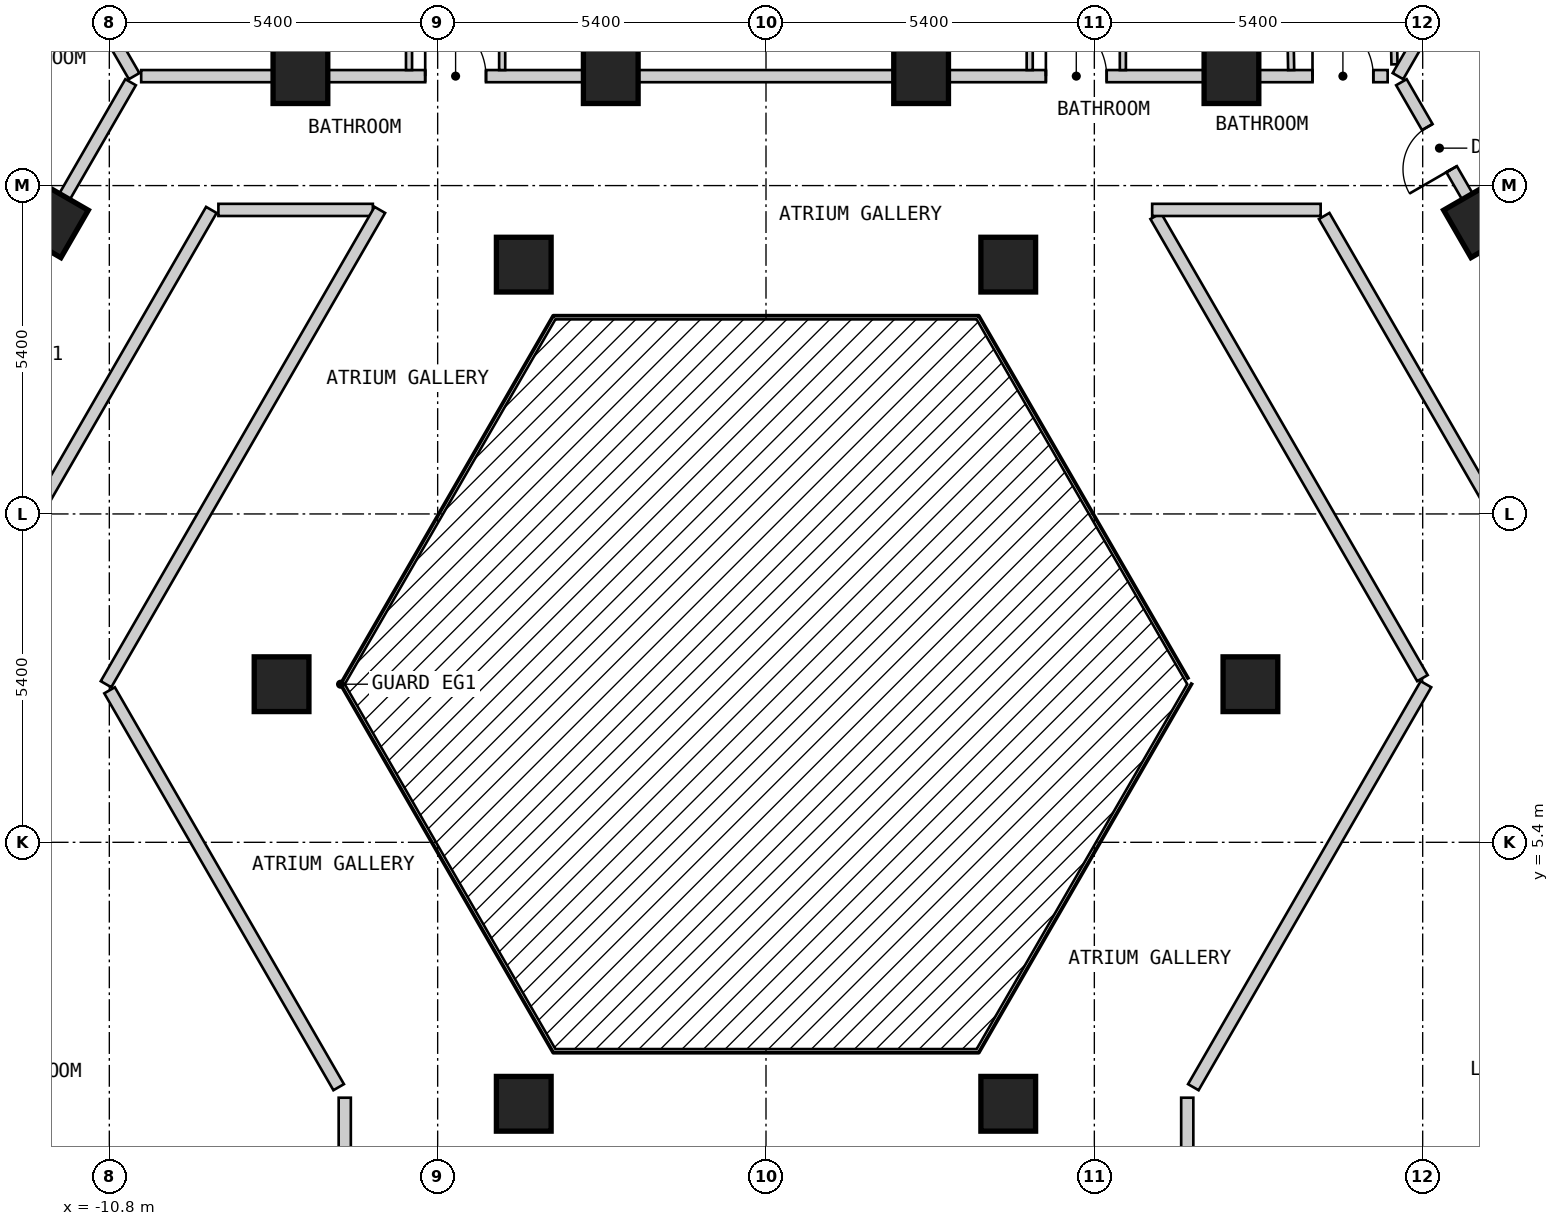
"""IFC4 building model, lengths in metres.
Left out: names, types, materials, properties, quantities, classifications, styles, units other than length and angle.
Written with IfcOpenShell. Run it as: python <this file> out.ifc"""

import sys

from ifc_helpers import new_model, si_unit, direction, frame, frame_2d, origin, origin_2d, place, context, subcontext, project, spatial, rectangle, extrude, element, fill, save


model = new_model("IFC4")
c1 = context("Model", 3, precision=1e-05, world=origin(), true_north=direction((0.0, 1.0)))
c2 = subcontext(c1, "Body", "Model", "MODEL_VIEW")
j1 = project(units=[si_unit("LENGTHUNIT", "METRE"), si_unit("PLANEANGLEUNIT", "RADIAN")], contexts=[c1])
p1 = place(None, origin())
s1 = spatial("IfcSite", under=j1, at=p1, CompositionType="ELEMENT")
p2 = place(p1, origin())
s2 = spatial("IfcBuilding", under=s1, at=p2, CompositionType="ELEMENT")
p3 = place(p2, frame((0.0, 0.0, 59.4)))
s3 = spatial("IfcBuildingStorey", under=s2, at=p3, CompositionType="ELEMENT", Elevation=59.4)
for number, where, z_axis, x_axis in (
    (1, (3.984, 1.1, 0.0), (0.0, 0.0, 1.0), (1.0, 0.0, 0.0)),
    (2, (7.967, 8.0, 0.0), (0.0, 0.0, 1.0), (1.0, 0.0, 0.0)),
    (3, (11.76, 15.631, 0.0), (0.0, 0.0, 1.0), (-0.5, 0.866, 0.0)),
    (4, (7.655, 18.0, 0.0), (0.0, 0.0, 1.0), (-1.0, 0.0, 0.0)),
    (5, (3.984, 14.9, 0.0), (0.0, 0.0, 1.0), (1.0, 0.0, 0.0)),
    (6, (2.551, 18.0, 0.0), (0.0, 0.0, 1.0), (-1.0, 0.0, 0.0)),
    (7, (-2.553, 18.0, 0.0), (0.0, 0.0, 1.0), (-1.0, 0.0, 0.0)),
    (8, (-3.984, 14.9, 0.0), (0.0, 0.0, 1.0), (1.0, 0.0, 0.0)),
    (9, (-7.657, 18.0, 0.0), (0.0, 0.0, 1.0), (-1.0, 0.0, 0.0)),
    (10, (-11.761, 15.63, 0.0), (0.0, 0.0, 1.0), (-0.5, -0.866, 0.0)),
    (11, (-7.967, 8.0, 0.0), (0.0, 0.0, 1.0), (1.0, 0.0, 0.0)),
    (12, (-3.984, 1.1, 0.0), (0.0, 0.0, 1.0), (1.0, 0.0, 0.0)),
):
    element("IfcColumn", number, at=place(p3, frame(where, z_axis=z_axis, x_axis=x_axis)), inside=s3, PredefinedType="COLUMN", context=c2, shape_type="SweptSolid", body=[
        extrude(rectangle(XDim=0.9, YDim=0.9, at=origin_2d()), origin(), (0.0, 0.0, 1.0), 3.0),
    ])
p4 = place(p3, frame((-10.796, 7.9, 0.0), z_axis=(0.0, 0.0, 1.0), x_axis=(0.499954271211, -0.866051803703, 0.0)))
e13 = element("IfcWall", 13, at=p4, inside=s3, PredefinedType="PARTITIONING", context=c2, shape_type="SweptSolid", body=[
    extrude(rectangle(XDim=7.536, YDim=0.2, at=frame_2d((3.768, 0.0))), origin(), (0.0, 0.0, 1.0), 2.6),
])
p5 = place(p3, frame((6.409, 15.7, 0.0), z_axis=(0.0, 0.0, 1.0), x_axis=(0.499930377127, -0.866065596838, 0.0)))
e14 = element("IfcWall", 14, at=p5, inside=s3, PredefinedType="PARTITIONING", context=c2, shape_type="SweptSolid", body=[
    extrude(rectangle(XDim=8.775, YDim=0.2, at=frame_2d((4.388, 0.0))), origin(), (0.0, 0.0, 1.0), 2.6),
])
p6 = place(p3, frame((9.18, 15.7, 0.0), z_axis=(0.0, 0.0, 1.0), x_axis=(0.500003652032, -0.866023295272, 0.0)))
e15 = element("IfcWall", 15, at=p6, inside=s3, PredefinedType="PARTITIONING", context=c2, shape_type="SweptSolid", body=[
    extrude(rectangle(XDim=18.012, YDim=0.2, at=frame_2d((9.006, 0.0))), origin(), (0.0, 0.0, 1.0), 2.6),
])
p7 = place(p6, frame((8.556, 0.0, 0.0)))
e16 = element("IfcOpeningElement", 16, at=p7, cuts=e15, PredefinedType="OPENING", context=c2, shape_type="SweptSolid", body=[
    extrude(rectangle(XDim=0.9, YDim=2.1, at=frame_2d((0.45, 1.05))), frame((0.0, 0.11, 0.0), z_axis=(0.0, -1.0, 0.0), x_axis=(1.0, 0.0, 0.0)), (0.0, 0.0, 1.0), 0.22),
])
p8 = place(p3, frame((10.45, 17.9, 0.0), z_axis=(0.0, 0.0, 1.0), x_axis=(0.500034352617, -0.866005569383, 0.0)))
e17 = element("IfcWall", 17, at=p8, inside=s3, PredefinedType="PARTITIONING", context=c2, shape_type="SweptSolid", body=[
    extrude(rectangle(XDim=20.553, YDim=0.2, at=frame_2d((10.276, 0.0))), origin(), (0.0, 0.0, 1.0), 2.6),
])
p9 = place(p8, frame((14.903, 0.0, 0.0)))
e18 = element("IfcOpeningElement", 18, at=p9, cuts=e17, PredefinedType="OPENING", context=c2, shape_type="SweptSolid", body=[
    extrude(rectangle(XDim=1.0, YDim=2.1, at=frame_2d((0.5, 1.05))), frame((0.0, 0.11, 0.0), z_axis=(0.0, -1.0, 0.0), x_axis=(1.0, 0.0, 0.0)), (0.0, 0.0, 1.0), 0.22),
])
p10 = place(p8, frame((9.775, 0.0, 0.0)))
e19 = element("IfcOpeningElement", 19, at=p10, cuts=e17, PredefinedType="OPENING", context=c2, shape_type="SweptSolid", body=[
    extrude(rectangle(XDim=1.0, YDim=2.1, at=frame_2d((0.5, 1.05))), frame((0.0, 0.11, 0.0), z_axis=(0.0, -1.0, 0.0), x_axis=(1.0, 0.0, 0.0)), (0.0, 0.0, 1.0), 0.22),
])
p11 = place(p8, frame((0.852, 0.0, 0.0)))
e20 = element("IfcOpeningElement", 20, at=p11, cuts=e17, PredefinedType="OPENING", context=c2, shape_type="SweptSolid", body=[
    extrude(rectangle(XDim=0.8, YDim=2.1, at=frame_2d((0.4, 1.05))), frame((0.0, 0.11, 0.0), z_axis=(0.0, -1.0, 0.0), x_axis=(1.0, 0.0, 0.0)), (0.0, 0.0, 1.0), 0.22),
])
p12 = place(p3, frame((-9.006, 15.8, 0.0), z_axis=(0.0, 0.0, 1.0), x_axis=(1.0, 0.0, 0.0)))
e21 = element("IfcWall", 21, at=p12, inside=s3, PredefinedType="PARTITIONING", context=c2, shape_type="SweptSolid", body=[
    extrude(rectangle(XDim=2.54, YDim=0.2, at=frame_2d((1.27, 0.0))), origin(), (0.0, 0.0, 1.0), 2.6),
])
p13 = place(p3, frame((6.351, 15.8, 0.0), z_axis=(0.0, 0.0, 1.0), x_axis=(1.0, 0.0, 0.0)))
e22 = element("IfcWall", 22, at=p13, inside=s3, PredefinedType="PARTITIONING", context=c2, shape_type="SweptSolid", body=[
    extrude(rectangle(XDim=2.771, YDim=0.2, at=frame_2d((1.385, 0.0))), origin(), (0.0, 0.0, 1.0), 2.6),
])
p14 = place(p3, frame((-10.276, 18.0, 0.0), z_axis=(0.0, 0.0, 1.0), x_axis=(1.0, 0.0, 0.0)))
e23 = element("IfcWall", 23, at=p14, inside=s3, PredefinedType="PARTITIONING", context=c2, shape_type="SweptSolid", body=[
    extrude(rectangle(XDim=20.5, YDim=0.2, at=frame_2d((10.25, 0.0))), origin(), (0.0, 0.0, 1.0), 2.6),
])
p15 = place(p14, frame((19.264, 0.0, 0.0)))
e24 = element("IfcOpeningElement", 24, at=p15, cuts=e23, PredefinedType="OPENING", context=c2, shape_type="SweptSolid", body=[
    extrude(rectangle(XDim=1.0, YDim=2.1, at=frame_2d((0.5, 1.05))), frame((0.0, 0.11, 0.0), z_axis=(0.0, -1.0, 0.0), x_axis=(1.0, 0.0, 0.0)), (0.0, 0.0, 1.0), 0.22),
])
p16 = place(p14, frame((14.879, 0.0, 0.0)))
e25 = element("IfcOpeningElement", 25, at=p16, cuts=e23, PredefinedType="OPENING", context=c2, shape_type="SweptSolid", body=[
    extrude(rectangle(XDim=1.0, YDim=2.1, at=frame_2d((0.5, 1.05))), frame((0.0, 0.11, 0.0), z_axis=(0.0, -1.0, 0.0), x_axis=(1.0, 0.0, 0.0)), (0.0, 0.0, 1.0), 0.22),
])
p17 = place(p14, frame((4.671, 0.0, 0.0)))
e26 = element("IfcOpeningElement", 26, at=p17, cuts=e23, PredefinedType="OPENING", context=c2, shape_type="SweptSolid", body=[
    extrude(rectangle(XDim=1.0, YDim=2.1, at=frame_2d((0.5, 1.05))), frame((0.0, 0.11, 0.0), z_axis=(0.0, -1.0, 0.0), x_axis=(1.0, 0.0, 0.0)), (0.0, 0.0, 1.0), 0.22),
])
p18 = place(p3, frame((7.028, 1.373, 0.0), z_axis=(0.0, 0.0, 1.0), x_axis=(0.49998574534, 0.86603363356, 0.0)))
e27 = element("IfcWall", 27, at=p18, inside=s3, PredefinedType="PARTITIONING", context=c2, shape_type="SweptSolid", body=[
    extrude(rectangle(XDim=7.652, YDim=0.2, at=frame_2d((3.826, 0.0))), origin(), (0.0, 0.0, 1.0), 2.6),
])
p19 = place(p3, frame((-10.854, 8.0, 0.0), z_axis=(0.0, 0.0, 1.0), x_axis=(0.499964141897, 0.86604610548, 0.0)))
e28 = element("IfcWall", 28, at=p19, inside=s3, PredefinedType="PARTITIONING", context=c2, shape_type="SweptSolid", body=[
    extrude(rectangle(XDim=9.007, YDim=0.2, at=frame_2d((4.503, 0.0))), origin(), (0.0, 0.0, 1.0), 2.6),
])
p20 = place(p3, frame((-18.244, -0.001, 0.0), z_axis=(0.0, 0.0, 1.0), x_axis=(0.499962999376, 0.866046765051, 0.0)))
e29 = element("IfcWall", 29, at=p20, inside=s3, PredefinedType="PARTITIONING", context=c2, shape_type="SweptSolid", body=[
    extrude(rectangle(XDim=18.245, YDim=0.2, at=frame_2d((9.123, 0.0))), origin(), (0.0, 0.0, 1.0), 2.6),
])
p21 = place(p20, frame((8.672, 0.0, 0.0)))
e30 = element("IfcOpeningElement", 30, at=p21, cuts=e29, PredefinedType="OPENING", context=c2, shape_type="SweptSolid", body=[
    extrude(rectangle(XDim=0.9, YDim=2.1, at=frame_2d((0.45, 1.05))), frame((0.0, 0.11, 0.0), z_axis=(0.0, -1.0, 0.0), x_axis=(1.0, 0.0, 0.0)), (0.0, 0.0, 1.0), 0.22),
])
p22 = place(p3, frame((-20.727, 0.099, 0.0), z_axis=(0.0, 0.0, 1.0), x_axis=(0.499993204491, 0.866029327138, 0.0)))
e31 = element("IfcWall", 31, at=p22, inside=s3, PredefinedType="PARTITIONING", context=c2, shape_type="SweptSolid", body=[
    extrude(rectangle(XDim=20.554, YDim=0.2, at=frame_2d((10.277, 0.0))), origin(), (0.0, 0.0, 1.0), 2.6),
])
p23 = place(p22, frame((14.88, 0.0, 0.0)))
e32 = element("IfcOpeningElement", 32, at=p23, cuts=e31, PredefinedType="OPENING", context=c2, shape_type="SweptSolid", body=[
    extrude(rectangle(XDim=1.0, YDim=2.1, at=frame_2d((0.5, 1.05))), frame((0.0, 0.11, 0.0), z_axis=(0.0, -1.0, 0.0), x_axis=(1.0, 0.0, 0.0)), (0.0, 0.0, 1.0), 0.22),
])
p24 = place(p22, frame((4.673, 0.0, 0.0)))
e33 = element("IfcOpeningElement", 33, at=p24, cuts=e31, PredefinedType="OPENING", context=c2, shape_type="SweptSolid", body=[
    extrude(rectangle(XDim=1.0, YDim=2.1, at=frame_2d((0.5, 1.05))), frame((0.0, 0.11, 0.0), z_axis=(0.0, -1.0, 0.0), x_axis=(1.0, 0.0, 0.0)), (0.0, 0.0, 1.0), 0.22),
])
p25 = place(p22, frame((0.838, 0.0, 0.0)))
e34 = element("IfcOpeningElement", 34, at=p25, cuts=e31, PredefinedType="OPENING", context=c2, shape_type="SweptSolid", body=[
    extrude(rectangle(XDim=0.8, YDim=2.1, at=frame_2d((0.4, 1.05))), frame((0.0, 0.11, 0.0), z_axis=(0.0, -1.0, 0.0), x_axis=(1.0, 0.0, 0.0)), (0.0, 0.0, 1.0), 0.22),
])
for number, where, z_axis, x_axis in (
    (35, (6.928, -2.8, 0.0), (0.0, 0.0, 1.0), (0.0, 1.0, 0.0)),
    (36, (-6.928, -2.8, 0.0), (0.0, 0.0, 1.0), (0.0, 1.0, 0.0)),
):
    element("IfcWall", number, at=place(p3, frame(where, z_axis=z_axis, x_axis=x_axis)), inside=s3, PredefinedType="PARTITIONING", context=c2, shape_type="SweptSolid", body=[
        extrude(rectangle(XDim=4.0, YDim=0.2, at=frame_2d((2.0, 0.0))), origin(), (0.0, 0.0, 1.0), 2.6),
    ])
p26 = place(p3, frame((8.562, 22.15, 0.0), z_axis=(0.0, 0.0, 1.0), x_axis=(0.018504185939, -0.999828782894, 0.0)))
e37 = element("IfcWall", 37, at=p26, inside=s3, PredefinedType="PARTITIONING", context=c2, shape_type="SweptSolid", body=[
    extrude(rectangle(XDim=4.051, YDim=0.1, at=frame_2d((2.025, 0.0))), origin(), (0.0, 0.0, 1.0), 2.6),
])
p27 = place(p26, frame((1.65, 0.0, 0.0)))
e38 = element("IfcOpeningElement", 38, at=p27, cuts=e37, PredefinedType="OPENING", context=c2, shape_type="SweptSolid", body=[
    extrude(rectangle(XDim=0.8, YDim=2.1, at=frame_2d((0.4, 1.05))), frame((0.0, 0.06, 0.0), z_axis=(0.0, -1.0, 0.0), x_axis=(1.0, 0.0, 0.0)), (0.0, 0.0, 1.0), 0.12),
])
p28 = place(p3, frame((10.262, 22.15, 0.0), z_axis=(0.0, 0.0, 1.0), x_axis=(0.018696971826, -0.999825196344, 0.0)))
e39 = element("IfcWall", 39, at=p28, inside=s3, PredefinedType="PARTITIONING", context=c2, shape_type="SweptSolid", body=[
    extrude(rectangle(XDim=3.957, YDim=0.1, at=frame_2d((1.978, 0.0))), origin(), (0.0, 0.0, 1.0), 2.6),
])
p29 = place(p28, frame((1.6, 0.0, 0.0)))
e40 = element("IfcOpeningElement", 40, at=p29, cuts=e39, PredefinedType="OPENING", context=c2, shape_type="SweptSolid", body=[
    extrude(rectangle(XDim=0.9, YDim=2.1, at=frame_2d((0.45, 1.05))), frame((0.0, 0.06, 0.0), z_axis=(0.0, -1.0, 0.0), x_axis=(1.0, 0.0, 0.0)), (0.0, 0.0, 1.0), 0.12),
])
p30 = place(p3, frame((-4.339, 20.609, 0.0), z_axis=(0.0, 0.0, 1.0), x_axis=(0.0, -1.0, 0.0)))
e41 = element("IfcWall", 41, at=p30, inside=s3, PredefinedType="PARTITIONING", context=c2, shape_type="SweptSolid", body=[
    extrude(rectangle(XDim=2.509, YDim=0.1, at=frame_2d((1.254, 0.0))), origin(), (0.0, 0.0, 1.0), 2.6),
])
p31 = place(p30, frame((0.829, 0.0, 0.0)))
e42 = element("IfcOpeningElement", 42, at=p31, cuts=e41, PredefinedType="OPENING", context=c2, shape_type="SweptSolid", body=[
    extrude(rectangle(XDim=0.9, YDim=2.1, at=frame_2d((0.45, 1.05))), frame((0.0, 0.06, 0.0), z_axis=(0.0, -1.0, 0.0), x_axis=(1.0, 0.0, 0.0)), (0.0, 0.0, 1.0), 0.12),
])
p32 = place(p3, frame((2.551, 21.57, 0.0), z_axis=(0.0, 0.0, 1.0), x_axis=(0.0, -1.0, 0.0)))
e43 = element("IfcWall", 43, at=p32, inside=s3, PredefinedType="PARTITIONING", context=c2, shape_type="SweptSolid", body=[
    extrude(rectangle(XDim=3.47, YDim=0.1, at=frame_2d((1.735, 0.0))), origin(), (0.0, 0.0, 1.0), 2.6),
])
p33 = place(p3, frame((4.337, 18.1, 0.0), z_axis=(0.0, 0.0, 1.0), x_axis=(0.0, 1.0, 0.0)))
e44 = element("IfcWall", 44, at=p33, inside=s3, PredefinedType="PARTITIONING", context=c2, shape_type="SweptSolid", body=[
    extrude(rectangle(XDim=2.559, YDim=0.1, at=frame_2d((1.279, 0.0))), origin(), (0.0, 0.0, 1.0), 2.6),
])
p34 = place(p33, frame((0.78, 0.0, 0.0)))
e45 = element("IfcOpeningElement", 45, at=p34, cuts=e44, PredefinedType="OPENING", context=c2, shape_type="SweptSolid", body=[
    extrude(rectangle(XDim=0.9, YDim=2.1, at=frame_2d((0.45, 1.05))), frame((0.0, 0.06, 0.0), z_axis=(0.0, -1.0, 0.0), x_axis=(1.0, 0.0, 0.0)), (0.0, 0.0, 1.0), 0.12),
])
p35 = place(p3, frame((5.869, 18.1, 0.0), z_axis=(0.0, 0.0, 1.0), x_axis=(0.0, 1.0, 0.0)))
e46 = element("IfcWall", 46, at=p35, inside=s3, PredefinedType="PARTITIONING", context=c2, shape_type="SweptSolid", body=[
    extrude(rectangle(XDim=2.51, YDim=0.1, at=frame_2d((1.255, 0.0))), origin(), (0.0, 0.0, 1.0), 2.6),
])
p36 = place(p35, frame((0.83, 0.0, 0.0)))
e47 = element("IfcOpeningElement", 47, at=p36, cuts=e46, PredefinedType="OPENING", context=c2, shape_type="SweptSolid", body=[
    extrude(rectangle(XDim=0.8, YDim=2.1, at=frame_2d((0.4, 1.05))), frame((0.0, 0.06, 0.0), z_axis=(0.0, -1.0, 0.0), x_axis=(1.0, 0.0, 0.0)), (0.0, 0.0, 1.0), 0.12),
])
p37 = place(p3, frame((-5.871, 18.1, 0.0), z_axis=(0.0, 0.0, 1.0), x_axis=(0.0, 1.0, 0.0)))
e48 = element("IfcWall", 48, at=p37, inside=s3, PredefinedType="PARTITIONING", context=c2, shape_type="SweptSolid", body=[
    extrude(rectangle(XDim=2.51, YDim=0.1, at=frame_2d((1.255, 0.0))), origin(), (0.0, 0.0, 1.0), 2.6),
])
p38 = place(p37, frame((0.83, 0.0, 0.0)))
e49 = element("IfcOpeningElement", 49, at=p38, cuts=e48, PredefinedType="OPENING", context=c2, shape_type="SweptSolid", body=[
    extrude(rectangle(XDim=0.8, YDim=2.1, at=frame_2d((0.4, 1.05))), frame((0.0, 0.06, 0.0), z_axis=(0.0, -1.0, 0.0), x_axis=(1.0, 0.0, 0.0)), (0.0, 0.0, 1.0), 0.12),
])
p39 = place(p3, frame((-7.657, 18.1, 0.0), z_axis=(0.0, 0.0, 1.0), x_axis=(0.0, 1.0, 0.0)))
e50 = element("IfcWall", 50, at=p39, inside=s3, PredefinedType="PARTITIONING", context=c2, shape_type="SweptSolid", body=[
    extrude(rectangle(XDim=2.58, YDim=0.1, at=frame_2d((1.29, 0.0))), origin(), (0.0, 0.0, 1.0), 2.6),
])
p40 = place(p3, frame((-12.629, 21.874, 0.0), z_axis=(0.0, 0.0, 1.0), x_axis=(0.500024801635, -0.86601108408, 0.0)))
e51 = element("IfcWall", 51, at=p40, inside=s3, PredefinedType="PARTITIONING", context=c2, shape_type="SweptSolid", body=[
    extrude(rectangle(XDim=4.473, YDim=0.2, at=frame_2d((2.237, 0.0))), origin(), (0.0, 0.0, 1.0), 2.6),
])
p41 = place(p3, frame((7.655, 20.68, 0.0), z_axis=(0.0, 0.0, 1.0), x_axis=(0.0, -1.0, 0.0)))
e52 = element("IfcWall", 52, at=p41, inside=s3, PredefinedType="PARTITIONING", context=c2, shape_type="SweptSolid", body=[
    extrude(rectangle(XDim=2.58, YDim=0.2, at=frame_2d((1.29, 0.0))), origin(), (0.0, 0.0, 1.0), 2.6),
])
p42 = place(p3, frame((10.393, 18.0, 0.0), z_axis=(0.0, 0.0, 1.0), x_axis=(0.499945497007, 0.866056868816, 0.0)))
e53 = element("IfcWall", 53, at=p42, inside=s3, PredefinedType="PARTITIONING", context=c2, shape_type="SweptSolid", body=[
    extrude(rectangle(XDim=10.265, YDim=0.2, at=frame_2d((5.132, 0.0))), origin(), (0.0, 0.0, 1.0), 2.6),
])
p43 = place(p3, frame((-2.553, 18.1, 0.0), z_axis=(0.0, 0.0, 1.0), x_axis=(0.0, 1.0, 0.0)))
e54 = element("IfcWall", 54, at=p43, inside=s3, PredefinedType="PARTITIONING", context=c2, shape_type="SweptSolid", body=[
    extrude(rectangle(XDim=3.5, YDim=0.2, at=frame_2d((1.75, 0.0))), origin(), (0.0, 0.0, 1.0), 2.6),
])
p44 = place(p11, origin())
e55 = element("IfcDoor", 55, at=p44, inside=s3, OperationType="SINGLE_SWING_RIGHT", PredefinedType="DOOR", context=c2, shape_type="SweptSolid", body=[
    extrude(rectangle(XDim=0.8, YDim=2.1, at=frame_2d((0.4, 1.05))), frame((0.0, 0.025, 0.0), z_axis=(0.0, -1.0, 0.0), x_axis=(1.0, 0.0, 0.0)), (0.0, 0.0, 1.0), 0.05),
])
fill(e20, e55)
p45 = place(p15, origin())
e56 = element("IfcDoor", 56, at=p45, inside=s3, OperationType="SINGLE_SWING_LEFT", PredefinedType="DOOR", context=c2, shape_type="SweptSolid", body=[
    extrude(rectangle(XDim=1.0, YDim=2.1, at=frame_2d((0.5, 1.05))), frame((0.0, 0.025, 0.0), z_axis=(0.0, -1.0, 0.0), x_axis=(1.0, 0.0, 0.0)), (0.0, 0.0, 1.0), 0.05),
])
fill(e24, e56)
p46 = place(p16, origin())
e57 = element("IfcDoor", 57, at=p46, inside=s3, OperationType="SINGLE_SWING_LEFT", PredefinedType="DOOR", context=c2, shape_type="SweptSolid", body=[
    extrude(rectangle(XDim=1.0, YDim=2.1, at=frame_2d((0.5, 1.05))), frame((0.0, 0.025, 0.0), z_axis=(0.0, -1.0, 0.0), x_axis=(1.0, 0.0, 0.0)), (0.0, 0.0, 1.0), 0.05),
])
fill(e25, e57)
p47 = place(p17, origin())
e58 = element("IfcDoor", 58, at=p47, inside=s3, OperationType="SINGLE_SWING_LEFT", PredefinedType="DOOR", context=c2, shape_type="SweptSolid", body=[
    extrude(rectangle(XDim=1.0, YDim=2.1, at=frame_2d((0.5, 1.05))), frame((0.0, 0.025, 0.0), z_axis=(0.0, -1.0, 0.0), x_axis=(1.0, 0.0, 0.0)), (0.0, 0.0, 1.0), 0.05),
])
fill(e26, e58)
save(model, sys.argv[1])
